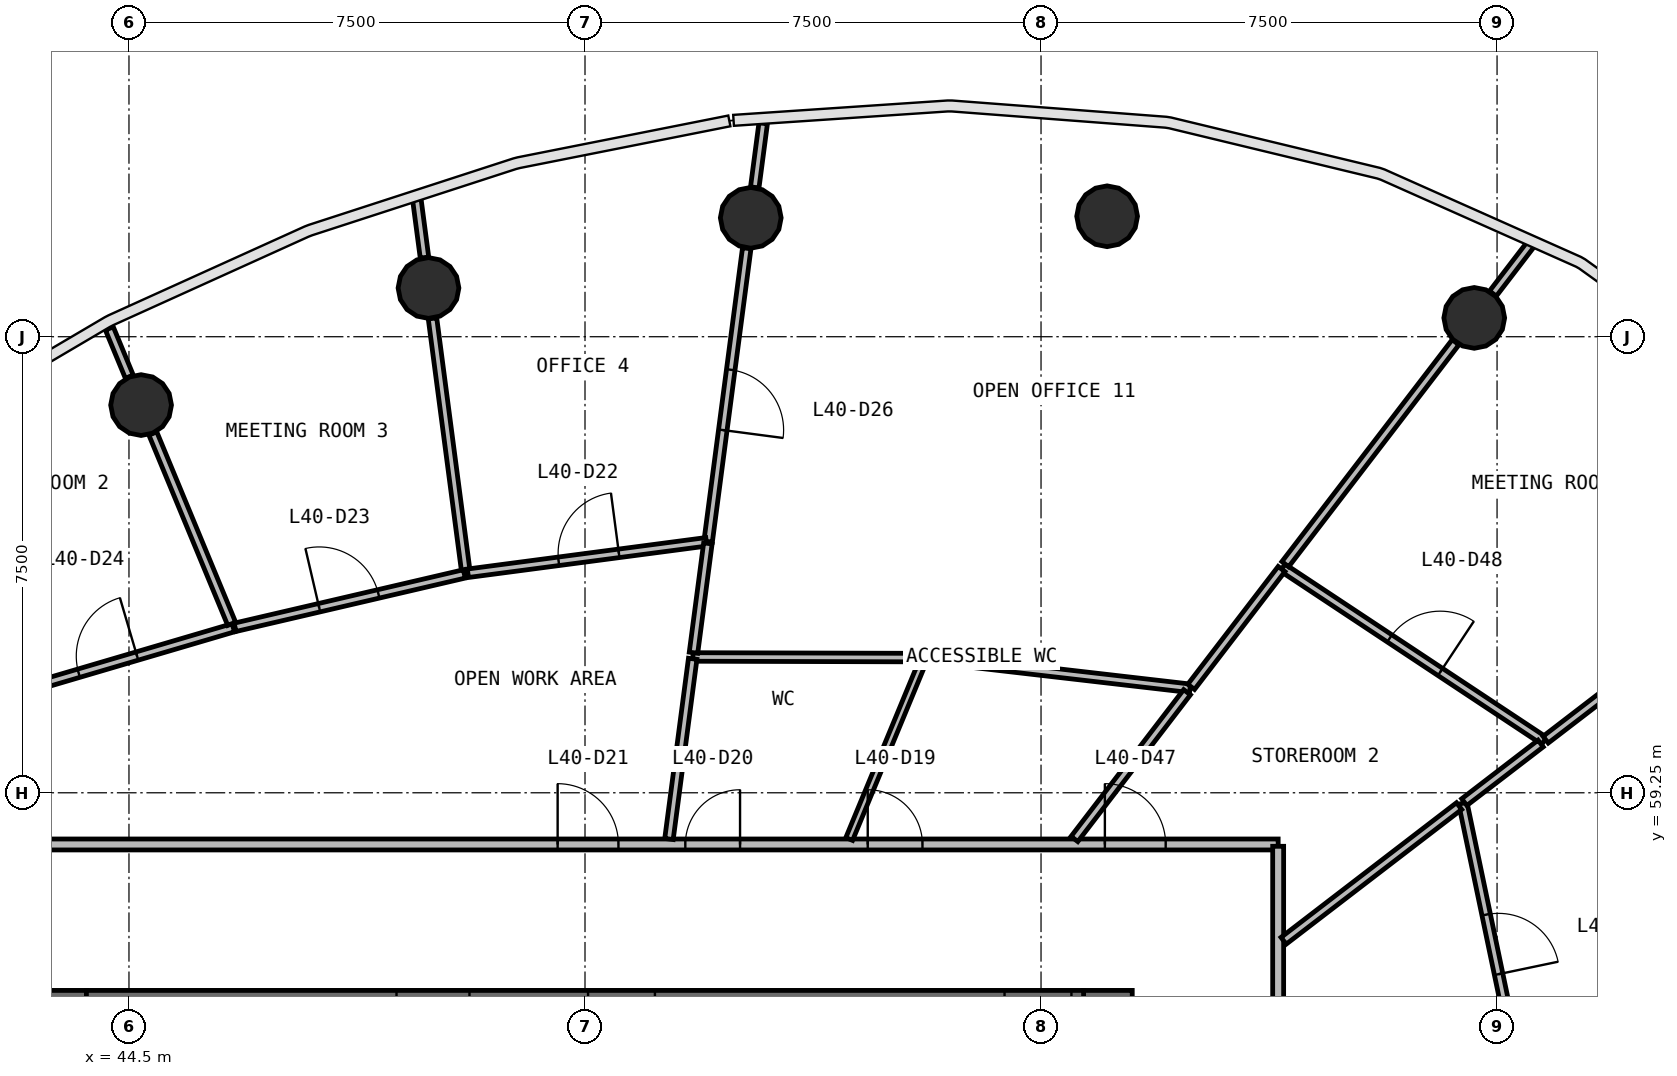
"""IFC4 building model, lengths in metres.
Left out: names, types, materials, properties, quantities, classifications, styles, units other than length and angle.
Written with IfcOpenShell. Run it as: python <this file> out.ifc"""

import sys

from ifc_helpers import new_model, si_unit, direction, frame, frame_2d, origin, origin_2d, place, context, subcontext, project, spatial, rectangle, circle, extrude, source, transform, mapped, element, fill, save


model = new_model("IFC4")
c1 = context("Model", 3, precision=1e-05, world=origin(), true_north=direction((0.0, 1.0)))
c2 = subcontext(c1, "Body", "Model", "MODEL_VIEW")
j1 = project(units=[si_unit("LENGTHUNIT", "METRE"), si_unit("PLANEANGLEUNIT", "RADIAN")], contexts=[c1])
p1 = place(None, origin())
s1 = spatial("IfcSite", under=j1, at=p1, CompositionType="ELEMENT")
p2 = place(p1, origin())
s2 = spatial("IfcBuilding", under=s1, at=p2, CompositionType="ELEMENT")
p3 = place(p2, frame((0.0, 0.0, 168.2)))
s3 = spatial("IfcBuildingStorey", under=s2, at=p3, CompositionType="ELEMENT", Elevation=168.2)
p4 = place(p3, frame((60.6, 40.0, 0.0), z_axis=(0.0, 0.0, 1.0), x_axis=(0.0, 1.0, 0.0)))
e1 = element("IfcWall", 1, at=p4, inside=s3, PredefinedType="SHEAR", context=c2, shape_type="SweptSolid", body=[
    extrude(rectangle(XDim=16.0, YDim=0.8, at=frame_2d((8.0, 0.0))), origin(), (0.0, 0.0, 1.0), 3.9),
])
p5 = place(p4, frame((7.1, 0.0, 0.0)))
e2 = element("IfcOpeningElement", 2, at=p5, cuts=e1, PredefinedType="OPENING", context=c2, shape_type="SweptSolid", body=[
    extrude(rectangle(XDim=1.8, YDim=2.1, at=frame_2d((0.9, 1.05))), frame((0.0, 0.41, 0.0), z_axis=(0.0, -1.0, 0.0), x_axis=(1.0, 0.0, 0.0)), (0.0, 0.0, 1.0), 0.82),
])
p6 = place(p3, frame((43.4, 56.0, 0.0), z_axis=(0.0, 0.0, 1.0), x_axis=(0.0, -1.0, 0.0)))
e3 = element("IfcWall", 3, at=p6, inside=s3, PredefinedType="SHEAR", context=c2, shape_type="SweptSolid", body=[
    extrude(rectangle(XDim=16.0, YDim=0.8, at=frame_2d((8.0, 0.0))), origin(), (0.0, 0.0, 1.0), 3.9),
])
p7 = place(p6, frame((7.1, 0.0, 0.0)))
e4 = element("IfcOpeningElement", 4, at=p7, cuts=e3, PredefinedType="OPENING", context=c2, shape_type="SweptSolid", body=[
    extrude(rectangle(XDim=1.8, YDim=2.1, at=frame_2d((0.9, 1.05))), frame((0.0, 0.41, 0.0), z_axis=(0.0, -1.0, 0.0), x_axis=(1.0, 0.0, 0.0)), (0.0, 0.0, 1.0), 0.82),
])
p8 = place(p3, frame((60.2, 55.6, 0.0), z_axis=(0.0, 0.0, 1.0), x_axis=(-1.0, 0.0, 0.0)))
e5 = element("IfcWall", 5, at=p8, inside=s3, PredefinedType="SHEAR", context=c2, shape_type="SweptSolid", body=[
    extrude(rectangle(XDim=16.4, YDim=0.8, at=frame_2d((8.2, 0.0))), origin(), (0.0, 0.0, 1.0), 3.9),
])
p9 = place(p8, frame((0.2, 0.0, 0.0)))
e6 = element("IfcOpeningElement", 6, at=p9, cuts=e5, PredefinedType="OPENING", context=c2, shape_type="SweptSolid", body=[
    extrude(rectangle(XDim=1.1, YDim=2.1, at=frame_2d((0.55, 1.05))), frame((0.0, 0.41, 0.0), z_axis=(0.0, -1.0, 0.0), x_axis=(1.0, 0.0, 0.0)), (0.0, 0.0, 1.0), 0.82),
])
p10 = place(p8, frame((10.1, 0.0, 0.0)))
e7 = element("IfcOpeningElement", 7, at=p10, cuts=e5, PredefinedType="OPENING", context=c2, shape_type="SweptSolid", body=[
    extrude(rectangle(XDim=1.2, YDim=2.1, at=frame_2d((0.6, 1.05))), frame((0.0, 0.41, 0.0), z_axis=(0.0, -1.0, 0.0), x_axis=(1.0, 0.0, 0.0)), (0.0, 0.0, 1.0), 0.82),
])
p11 = place(p8, frame((7.05, 0.0, 0.0)))
e8 = element("IfcOpeningElement", 8, at=p11, cuts=e5, PredefinedType="OPENING", context=c2, shape_type="SweptSolid", body=[
    extrude(rectangle(XDim=1.1, YDim=2.1, at=frame_2d((0.55, 1.05))), frame((0.0, 0.41, 0.0), z_axis=(0.0, -1.0, 0.0), x_axis=(1.0, 0.0, 0.0)), (0.0, 0.0, 1.0), 0.82),
])
m1 = source(origin(), c2, "Body", "SweptSolid", [
    extrude(circle(Radius=0.5, at=origin_2d()), origin(), (0.0, 0.0, 1.0), 3.9),
])
for number, where, z_axis, x_axis in (
    (9, (66.625, 67.06, 0.0), (0.0, 0.0, 1.0), (1.0, 0.0, 0.0)),
    (10, (60.587, 68.731, 0.0), (0.0, 0.0, 1.0), (1.0, 0.0, 0.0)),
    (11, (54.726, 68.705, 0.0), (0.0, 0.0, 1.0), (1.0, 0.0, 0.0)),
    (12, (49.426, 67.551, 0.0), (0.0, 0.0, 1.0), (1.0, 0.0, 0.0)),
    (13, (44.699, 65.626, 0.0), (0.0, 0.0, 1.0), (1.0, 0.0, 0.0)),
):
    element("IfcColumn", number, at=place(p3, frame(where, z_axis=z_axis, x_axis=x_axis)), inside=s3, PredefinedType="COLUMN", context=c2, shape_type="MappedRepresentation", body=[
        mapped(m1, transform((0.0, 0.0, 0.0), scale=1.0)),
    ])
p12 = place(p3, frame((40.6, 58.4, 0.0), z_axis=(0.0, 0.0, 1.0), x_axis=(1.0, 0.0, 0.0)))
e14 = element("IfcWall", 14, at=p12, inside=s3, PredefinedType="PARTITIONING", context=c2, shape_type="SweptSolid", body=[
    extrude(rectangle(XDim=22.8, YDim=0.18, at=frame_2d((11.4, 0.0))), origin(), (0.0, 0.0, 1.0), 2.88),
])
p13 = place(p12, frame((16.05, 0.0, 0.0)))
e15 = element("IfcOpeningElement", 15, at=p13, cuts=e14, PredefinedType="OPENING", context=c2, shape_type="SweptSolid", body=[
    extrude(rectangle(XDim=0.9, YDim=2.1, at=frame_2d((0.45, 1.05))), frame((0.0, 0.1, 0.0), z_axis=(0.0, -1.0, 0.0), x_axis=(1.0, 0.0, 0.0)), (0.0, 0.0, 1.0), 0.2),
])
p14 = place(p12, frame((13.05, 0.0, 0.0)))
e16 = element("IfcOpeningElement", 16, at=p14, cuts=e14, PredefinedType="OPENING", context=c2, shape_type="SweptSolid", body=[
    extrude(rectangle(XDim=0.9, YDim=2.1, at=frame_2d((0.45, 1.05))), frame((0.0, 0.1, 0.0), z_axis=(0.0, -1.0, 0.0), x_axis=(1.0, 0.0, 0.0)), (0.0, 0.0, 1.0), 0.2),
])
p15 = place(p12, frame((10.95, 0.0, 0.0)))
e17 = element("IfcOpeningElement", 17, at=p15, cuts=e14, PredefinedType="OPENING", context=c2, shape_type="SweptSolid", body=[
    extrude(rectangle(XDim=1.0, YDim=2.1, at=frame_2d((0.5, 1.05))), frame((0.0, 0.1, 0.0), z_axis=(0.0, -1.0, 0.0), x_axis=(1.0, 0.0, 0.0)), (0.0, 0.0, 1.0), 0.2),
])
p16 = place(p12, frame((19.95, 0.0, 0.0)))
e18 = element("IfcOpeningElement", 18, at=p16, cuts=e14, PredefinedType="OPENING", context=c2, shape_type="SweptSolid", body=[
    extrude(rectangle(XDim=1.0, YDim=2.1, at=frame_2d((0.5, 1.05))), frame((0.0, 0.1, 0.0), z_axis=(0.0, -1.0, 0.0), x_axis=(1.0, 0.0, 0.0)), (0.0, 0.0, 1.0), 0.2),
])
p17 = place(p3, frame((63.4, 58.37, 0.0), z_axis=(0.0, 0.0, 1.0), x_axis=(0.0, -1.0, 0.0)))
e19 = element("IfcWall", 19, at=p17, inside=s3, PredefinedType="PARTITIONING", context=c2, shape_type="SweptSolid", body=[
    extrude(rectangle(XDim=20.74, YDim=0.18, at=frame_2d((10.37, 0.0))), origin(), (0.0, 0.0, 1.0), 2.88),
])
p18 = place(p17, frame((12.09, 0.0, 0.0)))
e20 = element("IfcOpeningElement", 20, at=p18, cuts=e19, PredefinedType="OPENING", context=c2, shape_type="SweptSolid", body=[
    extrude(rectangle(XDim=1.0, YDim=2.1, at=frame_2d((0.5, 1.05))), frame((0.0, 0.1, 0.0), z_axis=(0.0, -1.0, 0.0), x_axis=(1.0, 0.0, 0.0)), (0.0, 0.0, 1.0), 0.2),
])
p19 = place(p17, frame((9.89, 0.0, 0.0)))
e21 = element("IfcOpeningElement", 21, at=p19, cuts=e19, PredefinedType="OPENING", context=c2, shape_type="SweptSolid", body=[
    extrude(rectangle(XDim=1.0, YDim=2.1, at=frame_2d((0.5, 1.05))), frame((0.0, 0.1, 0.0), z_axis=(0.0, -1.0, 0.0), x_axis=(1.0, 0.0, 0.0)), (0.0, 0.0, 1.0), 0.2),
])
p20 = place(p3, frame((67.419, 54.387, 0.0), z_axis=(0.0, 0.0, 1.0), x_axis=(0.923885532531, 0.382668946716, 0.0)))
e22 = element("IfcWall", 22, at=p20, inside=s3, PredefinedType="PARTITIONING", context=c2, shape_type="SweptSolid", body=[
    extrude(rectangle(XDim=7.048, YDim=0.14, at=frame_2d((3.524, 0.0))), origin(), (0.0, 0.0, 1.0), 2.88),
])
p21 = place(p3, frame((63.474, 62.954, 0.0), z_axis=(0.0, 0.0, 1.0), x_axis=(0.833735501744, -0.552164027379, 0.0)))
e23 = element("IfcWall", 23, at=p21, inside=s3, PredefinedType="PARTITIONING", context=c2, shape_type="SweptSolid", body=[
    extrude(rectangle(XDim=5.159, YDim=0.14, at=frame_2d((2.58, 0.0))), origin(), (0.0, 0.0, 1.0), 2.88),
])
p22 = place(p21, frame((2.109, 0.0, 0.0)))
e24 = element("IfcOpeningElement", 24, at=p22, cuts=e23, PredefinedType="OPENING", context=c2, shape_type="SweptSolid", body=[
    extrude(rectangle(XDim=1.0, YDim=2.1, at=frame_2d((0.5, 1.05))), frame((0.0, 0.08, 0.0), z_axis=(0.0, -1.0, 0.0), x_axis=(1.0, 0.0, 0.0)), (0.0, 0.0, 1.0), 0.16),
])
p23 = place(p3, frame((54.66, 68.205, 0.0), z_axis=(0.0, 0.0, 1.0), x_axis=(-0.130559647123, -0.991440456378, 0.0)))
e25 = element("IfcWall", 25, at=p23, inside=s3, PredefinedType="PARTITIONING", context=c2, shape_type="SweptSolid", body=[
    extrude(rectangle(XDim=4.866, YDim=0.14, at=frame_2d((2.433, 0.0))), origin(), (0.0, 0.0, 1.0), 2.88),
])
p24 = place(p23, frame((2.016, 0.0, 0.0)))
e26 = element("IfcOpeningElement", 26, at=p24, cuts=e25, PredefinedType="OPENING", context=c2, shape_type="SweptSolid", body=[
    extrude(rectangle(XDim=1.0, YDim=2.1, at=frame_2d((0.5, 1.05))), frame((0.0, 0.08, 0.0), z_axis=(0.0, -1.0, 0.0), x_axis=(1.0, 0.0, 0.0)), (0.0, 0.0, 1.0), 0.16),
])
p25 = place(p3, frame((66.437, 59.078, 0.0), z_axis=(0.0, 0.0, 1.0), x_axis=(0.20474910854, -0.978814488324, 0.0)))
e27 = element("IfcWall", 27, at=p25, inside=s3, PredefinedType="PARTITIONING", context=c2, shape_type="SweptSolid", body=[
    extrude(rectangle(XDim=4.722, YDim=0.14, at=frame_2d((2.361, 0.0))), origin(), (0.0, 0.0, 1.0), 2.88),
])
p26 = place(p25, frame((1.872, 0.0, 0.0)))
e28 = element("IfcOpeningElement", 28, at=p26, cuts=e27, PredefinedType="OPENING", context=c2, shape_type="SweptSolid", body=[
    extrude(rectangle(XDim=1.0, YDim=2.1, at=frame_2d((0.5, 1.05))), frame((0.0, 0.08, 0.0), z_axis=(0.0, -1.0, 0.0), x_axis=(1.0, 0.0, 0.0)), (0.0, 0.0, 1.0), 0.16),
])
p27 = place(p3, frame((63.517, 63.009, 0.0), z_axis=(0.0, 0.0, 1.0), x_axis=(0.608776844193, 0.793341511566, 0.0)))
e29 = element("IfcWall", 29, at=p27, inside=s3, PredefinedType="PARTITIONING", context=c2, shape_type="SweptSolid", body=[
    extrude(rectangle(XDim=4.601, YDim=0.14, at=frame_2d((2.3, 0.0))), origin(), (0.0, 0.0, 1.0), 2.88),
])
p28 = place(p3, frame((67.799, 60.123, 0.0), z_axis=(0.0, 0.0, 1.0), x_axis=(0.793350117956, 0.608765628414, 0.0)))
e30 = element("IfcWall", 30, at=p28, inside=s3, PredefinedType="PARTITIONING", context=c2, shape_type="SweptSolid", body=[
    extrude(rectangle(XDim=4.571, YDim=0.14, at=frame_2d((2.286, 0.0))), origin(), (0.0, 0.0, 1.0), 2.88),
])
p29 = place(p3, frame((61.951, 60.968, 0.0), z_axis=(0.0, 0.0, 1.0), x_axis=(-0.993392398036, 0.114767345203, 0.0)))
e31 = element("IfcWall", 31, at=p29, inside=s3, PredefinedType="PARTITIONING", context=c2, shape_type="SweptSolid", body=[
    extrude(rectangle(XDim=4.399, YDim=0.14, at=frame_2d((2.2, 0.0))), origin(), (0.0, 0.0, 1.0), 2.88),
])
p30 = place(p3, frame((50.044, 62.856, 0.0), z_axis=(0.0, 0.0, 1.0), x_axis=(-0.130515707309, 0.991446241682, 0.0)))
e32 = element("IfcWall", 32, at=p30, inside=s3, PredefinedType="PARTITIONING", context=c2, shape_type="SweptSolid", body=[
    extrude(rectangle(XDim=4.231, YDim=0.14, at=frame_2d((2.116, 0.0))), origin(), (0.0, 0.0, 1.0), 2.88),
])
p31 = place(p3, frame((42.222, 60.789, 0.0), z_axis=(0.0, 0.0, 1.0), x_axis=(0.959320664993, 0.282318723638, 0.0)))
e33 = element("IfcWall", 33, at=p31, inside=s3, PredefinedType="PARTITIONING", context=c2, shape_type="SweptSolid", body=[
    extrude(rectangle(XDim=4.163, YDim=0.14, at=frame_2d((2.082, 0.0))), origin(), (0.0, 0.0, 1.0), 2.88),
])
p32 = place(p31, frame((1.513, 0.0, 0.0)))
e34 = element("IfcOpeningElement", 34, at=p32, cuts=e33, PredefinedType="OPENING", context=c2, shape_type="SweptSolid", body=[
    extrude(rectangle(XDim=1.0, YDim=2.1, at=frame_2d((0.5, 1.05))), frame((0.0, 0.08, 0.0), z_axis=(0.0, -1.0, 0.0), x_axis=(1.0, 0.0, 0.0)), (0.0, 0.0, 1.0), 0.16),
])
p33 = place(p3, frame((50.074, 62.86, 0.0), z_axis=(0.0, 0.0, 1.0), x_axis=(0.991416645942, 0.130740330995, 0.0)))
e35 = element("IfcWall", 35, at=p33, inside=s3, PredefinedType="PARTITIONING", context=c2, shape_type="SweptSolid", body=[
    extrude(rectangle(XDim=3.955, YDim=0.14, at=frame_2d((1.978, 0.0))), origin(), (0.0, 0.0, 1.0), 2.88),
])
p34 = place(p33, frame((1.505, 0.0, 0.0)))
e36 = element("IfcOpeningElement", 36, at=p34, cuts=e35, PredefinedType="OPENING", context=c2, shape_type="SweptSolid", body=[
    extrude(rectangle(XDim=1.0, YDim=2.1, at=frame_2d((0.5, 1.05))), frame((0.0, 0.08, 0.0), z_axis=(0.0, -1.0, 0.0), x_axis=(1.0, 0.0, 0.0)), (0.0, 0.0, 1.0), 0.16),
])
p35 = place(p3, frame((46.245, 61.971, 0.0), z_axis=(0.0, 0.0, 1.0), x_axis=(0.973895613849, 0.22699632888, 0.0)))
e37 = element("IfcWall", 37, at=p35, inside=s3, PredefinedType="PARTITIONING", context=c2, shape_type="SweptSolid", body=[
    extrude(rectangle(XDim=3.871, YDim=0.14, at=frame_2d((1.936, 0.0))), origin(), (0.0, 0.0, 1.0), 2.88),
])
p36 = place(p35, frame((1.421, 0.0, 0.0)))
e38 = element("IfcOpeningElement", 38, at=p36, cuts=e37, PredefinedType="OPENING", context=c2, shape_type="SweptSolid", body=[
    extrude(rectangle(XDim=1.0, YDim=2.1, at=frame_2d((0.5, 1.05))), frame((0.0, 0.08, 0.0), z_axis=(0.0, -1.0, 0.0), x_axis=(1.0, 0.0, 0.0)), (0.0, 0.0, 1.0), 0.16),
])
p37 = place(p3, frame((63.49, 56.817, 0.0), z_axis=(0.0, 0.0, 1.0), x_axis=(0.79334701906, 0.60876966691, 0.0)))
e39 = element("IfcWall", 39, at=p37, inside=s3, PredefinedType="PARTITIONING", context=c2, shape_type="SweptSolid", body=[
    extrude(rectangle(XDim=3.637, YDim=0.14, at=frame_2d((1.819, 0.0))), origin(), (0.0, 0.0, 1.0), 2.88),
])
p38 = place(p3, frame((57.551, 61.473, 0.0), z_axis=(0.0, 0.0, 1.0), x_axis=(-0.999996312209, 0.002715799878, 0.0)))
e40 = element("IfcWall", 40, at=p38, inside=s3, PredefinedType="PARTITIONING", context=c2, shape_type="SweptSolid", body=[
    extrude(rectangle(XDim=3.776, YDim=0.14, at=frame_2d((1.888, 0.0))), origin(), (0.0, 0.0, 1.0), 2.88),
])
p39 = place(p3, frame((46.189, 62.029, 0.0), z_axis=(0.0, 0.0, 1.0), x_axis=(-0.382706061459, 0.923870158909, 0.0)))
e41 = element("IfcWall", 41, at=p39, inside=s3, PredefinedType="PARTITIONING", context=c2, shape_type="SweptSolid", body=[
    extrude(rectangle(XDim=3.388, YDim=0.14, at=frame_2d((1.694, 0.0))), origin(), (0.0, 0.0, 1.0), 2.88),
])
p40 = place(p3, frame((60.049, 58.49, 0.0), z_axis=(0.0, 0.0, 1.0), x_axis=(0.608721291082, 0.793384137592, 0.0)))
e42 = element("IfcWall", 42, at=p40, inside=s3, PredefinedType="PARTITIONING", context=c2, shape_type="SweptSolid", body=[
    extrude(rectangle(XDim=3.042, YDim=0.14, at=frame_2d((1.521, 0.0))), origin(), (0.0, 0.0, 1.0), 2.88),
])
p41 = place(p3, frame((53.381, 58.49, 0.0), z_axis=(0.0, 0.0, 1.0), x_axis=(0.130505214289, 0.991447622945, 0.0)))
e43 = element("IfcWall", 43, at=p41, inside=s3, PredefinedType="PARTITIONING", context=c2, shape_type="SweptSolid", body=[
    extrude(rectangle(XDim=2.99, YDim=0.14, at=frame_2d((1.495, 0.0))), origin(), (0.0, 0.0, 1.0), 2.88),
])
p42 = place(p3, frame((61.969, 60.992, 0.0), z_axis=(0.0, 0.0, 1.0), x_axis=(0.608807082058, 0.793318307387, 0.0)))
e44 = element("IfcWall", 44, at=p42, inside=s3, PredefinedType="PARTITIONING", context=c2, shape_type="SweptSolid", body=[
    extrude(rectangle(XDim=2.443, YDim=0.14, at=frame_2d((1.221, 0.0))), origin(), (0.0, 0.0, 1.0), 2.88),
])
p43 = place(p3, frame((53.784, 61.553, 0.0), z_axis=(0.0, 0.0, 1.0), x_axis=(0.1305938182, 0.991435955898, 0.0)))
e45 = element("IfcWall", 45, at=p43, inside=s3, PredefinedType="PARTITIONING", context=c2, shape_type="SweptSolid", body=[
    extrude(rectangle(XDim=1.813, YDim=0.14, at=frame_2d((0.907, 0.0))), origin(), (0.0, 0.0, 1.0), 2.88),
])
p44 = place(p3, frame((66.461, 59.096, 0.0), z_axis=(0.0, 0.0, 1.0), x_axis=(0.793380361994, 0.608726212022, 0.0)))
e46 = element("IfcWall", 46, at=p44, inside=s3, PredefinedType="PARTITIONING", context=c2, shape_type="SweptSolid", body=[
    extrude(rectangle(XDim=1.583, YDim=0.14, at=frame_2d((0.791, 0.0))), origin(), (0.0, 0.0, 1.0), 2.88),
])
p45 = place(p3, frame((54.792, 69.205, 0.0), z_axis=(0.0, 0.0, 1.0), x_axis=(0.130418875157, 0.991458984025, 0.0)))
e47 = element("IfcWall", 47, at=p45, inside=s3, PredefinedType="PARTITIONING", context=c2, shape_type="SweptSolid", body=[
    extrude(rectangle(XDim=1.063, YDim=0.14, at=frame_2d((0.532, 0.0))), origin(), (0.0, 0.0, 1.0), 2.88),
])
p46 = place(p3, frame((66.932, 67.46, 0.0), z_axis=(0.0, 0.0, 1.0), x_axis=(0.608863825282, 0.793274758367, 0.0)))
e48 = element("IfcWall", 48, at=p46, inside=s3, PredefinedType="PARTITIONING", context=c2, shape_type="SweptSolid", body=[
    extrude(rectangle(XDim=1.031, YDim=0.14, at=frame_2d((0.516, 0.0))), origin(), (0.0, 0.0, 1.0), 2.88),
])
p47 = place(p3, frame((49.36, 68.052, 0.0), z_axis=(0.0, 0.0, 1.0), x_axis=(-0.130591727785, 0.991436231249, 0.0)))
e49 = element("IfcWall", 49, at=p47, inside=s3, PredefinedType="PARTITIONING", context=c2, shape_type="SweptSolid", body=[
    extrude(rectangle(XDim=0.967, YDim=0.14, at=frame_2d((0.483, 0.0))), origin(), (0.0, 0.0, 1.0), 2.88),
])
p48 = place(p3, frame((44.506, 66.092, 0.0), z_axis=(0.0, 0.0, 1.0), x_axis=(-0.382636339827, 0.923899037473, 0.0)))
e50 = element("IfcWall", 50, at=p48, inside=s3, PredefinedType="PARTITIONING", context=c2, shape_type="SweptSolid", body=[
    extrude(rectangle(XDim=0.859, YDim=0.14, at=frame_2d((0.429, 0.0))), origin(), (0.0, 0.0, 1.0), 2.88),
])
p49 = place(p3, frame((56.345, 58.49, 0.0), z_axis=(0.0, 0.0, 1.0), x_axis=(0.382679838141, 0.92388102128, 0.0)))
e51 = element("IfcWall", 51, at=p49, inside=s3, PredefinedType="PARTITIONING", context=c2, shape_type="SweptSolid", body=[
    extrude(rectangle(XDim=3.199, YDim=0.12, at=frame_2d((1.599, 0.0))), origin(), (0.0, 0.0, 1.0), 2.88),
])
m2 = source(origin(), c2, "Body", "SweptSolid", [
    extrude(rectangle(XDim=0.9, YDim=2.1, at=frame_2d((0.45, 1.05))), frame((0.0, 0.025, 0.0), z_axis=(0.0, -1.0, 0.0), x_axis=(1.0, 0.0, 0.0)), (0.0, 0.0, 1.0), 0.05),
])
p50 = place(p13, origin())
e52 = element("IfcDoor", 52, at=p50, inside=s3, OperationType="SINGLE_SWING_LEFT", PredefinedType="DOOR", context=c2, shape_type="MappedRepresentation", body=[
    mapped(m2, transform((0.0, 0.0, 0.0), scale=1.0)),
])
fill(e15, e52)
p51 = place(p14, origin())
e53 = element("IfcDoor", 53, at=p51, inside=s3, OperationType="SINGLE_SWING_RIGHT", PredefinedType="DOOR", context=c2, shape_type="MappedRepresentation", body=[
    mapped(m2, transform((0.0, 0.0, 0.0), scale=1.0)),
])
fill(e16, e53)
m3 = source(origin(), c2, "Body", "SweptSolid", [
    extrude(rectangle(XDim=1.0, YDim=2.1, at=frame_2d((0.5, 1.05))), frame((0.0, 0.025, 0.0), z_axis=(0.0, -1.0, 0.0), x_axis=(1.0, 0.0, 0.0)), (0.0, 0.0, 1.0), 0.05),
])
p52 = place(p15, origin())
e54 = element("IfcDoor", 54, at=p52, inside=s3, OperationType="SINGLE_SWING_LEFT", PredefinedType="DOOR", context=c2, shape_type="MappedRepresentation", body=[
    mapped(m3, transform((0.0, 0.0, 0.0), scale=1.0)),
])
fill(e17, e54)
p53 = place(p34, origin())
e55 = element("IfcDoor", 55, at=p53, inside=s3, OperationType="SINGLE_SWING_RIGHT", PredefinedType="DOOR", context=c2, shape_type="MappedRepresentation", body=[
    mapped(m3, transform((0.0, 0.0, 0.0), scale=1.0)),
])
fill(e36, e55)
p54 = place(p36, origin())
e56 = element("IfcDoor", 56, at=p54, inside=s3, OperationType="SINGLE_SWING_LEFT", PredefinedType="DOOR", context=c2, shape_type="MappedRepresentation", body=[
    mapped(m3, transform((0.0, 0.0, 0.0), scale=1.0)),
])
fill(e38, e56)
p55 = place(p32, origin())
e57 = element("IfcDoor", 57, at=p55, inside=s3, OperationType="SINGLE_SWING_RIGHT", PredefinedType="DOOR", context=c2, shape_type="MappedRepresentation", body=[
    mapped(m3, transform((0.0, 0.0, 0.0), scale=1.0)),
])
fill(e34, e57)
p56 = place(p24, origin())
e58 = element("IfcDoor", 58, at=p56, inside=s3, OperationType="SINGLE_SWING_RIGHT", PredefinedType="DOOR", context=c2, shape_type="MappedRepresentation", body=[
    mapped(m3, transform((0.0, 0.0, 0.0), scale=1.0)),
])
fill(e26, e58)
p57 = place(p26, origin())
e59 = element("IfcDoor", 59, at=p57, inside=s3, OperationType="SINGLE_SWING_RIGHT", PredefinedType="DOOR", context=c2, shape_type="MappedRepresentation", body=[
    mapped(m3, transform((0.0, 0.0, 0.0), scale=1.0)),
])
fill(e28, e59)
p58 = place(p16, origin())
e60 = element("IfcDoor", 60, at=p58, inside=s3, OperationType="SINGLE_SWING_LEFT", PredefinedType="DOOR", context=c2, shape_type="MappedRepresentation", body=[
    mapped(m3, transform((0.0, 0.0, 0.0), scale=1.0)),
])
fill(e18, e60)
p59 = place(p22, origin())
e61 = element("IfcDoor", 61, at=p59, inside=s3, OperationType="SINGLE_SWING_RIGHT", PredefinedType="DOOR", context=c2, shape_type="MappedRepresentation", body=[
    mapped(m3, transform((0.0, 0.0, 0.0), scale=1.0)),
])
fill(e24, e61)
save(model, sys.argv[1])
